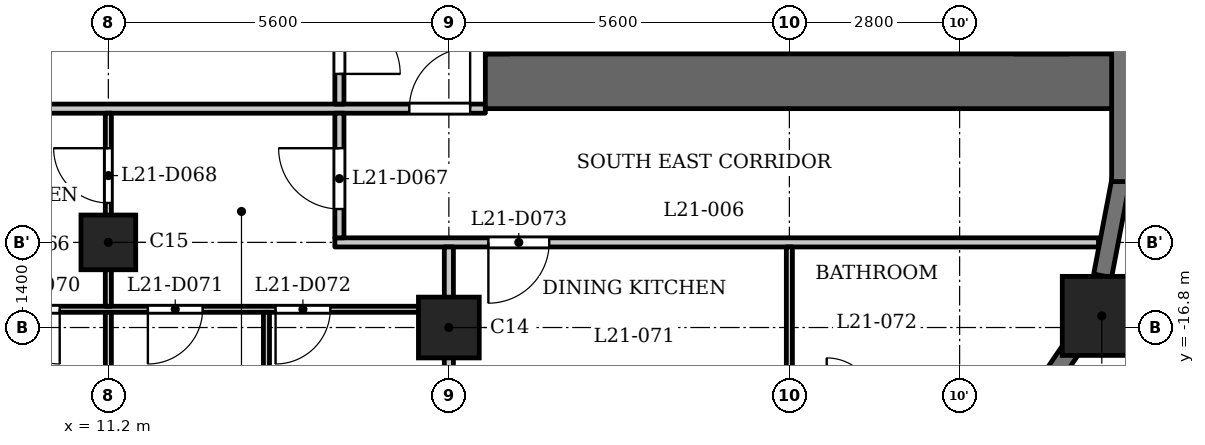
"""IFC4 building model, lengths in metres.
Left out: names, types, materials, properties, quantities, classifications, styles, units other than length and angle.
Written with IfcOpenShell. Run it as: python <this file> out.ifc"""

import sys

from ifc_helpers import new_model, si_unit, direction, frame, frame_2d, origin, origin_2d, place, context, subcontext, project, spatial, rectangle, extrude, element, fill, save


model = new_model("IFC4")
c1 = context("Model", 3, precision=1e-05, world=origin(), true_north=direction((0.0, 1.0)))
c2 = subcontext(c1, "Body", "Model", "MODEL_VIEW")
j1 = project(units=[si_unit("LENGTHUNIT", "METRE"), si_unit("PLANEANGLEUNIT", "RADIAN")], contexts=[c1])
p1 = place(None, origin())
s1 = spatial("IfcSite", under=j1, at=p1, CompositionType="ELEMENT")
p2 = place(p1, origin())
s2 = spatial("IfcBuilding", under=s1, at=p2, CompositionType="ELEMENT")
p3 = place(p2, frame((0.0, 0.0, 86.8)))
s3 = spatial("IfcBuildingStorey", under=s2, at=p3, CompositionType="ELEMENT", Elevation=86.8)
p4 = place(p3, frame((27.538, -16.609, 0.0), z_axis=(0.0, 0.0, 1.0), x_axis=(1.0, 0.0, 0.0)))
e1 = element("IfcColumn", 1, at=p4, inside=s3, PredefinedType="COLUMN", context=c2, shape_type="SweptSolid", body=[
    extrude(rectangle(XDim=1.3, YDim=1.3, at=origin_2d()), origin(), (0.0, 0.0, 1.0), 3.5),
])
p5 = place(p3, frame((16.8, -16.8, 0.0), z_axis=(0.0, 0.0, 1.0), x_axis=(1.0, 0.0, 0.0)))
e2 = element("IfcColumn", 2, at=p5, inside=s3, PredefinedType="COLUMN", context=c2, shape_type="SweptSolid", body=[
    extrude(rectangle(XDim=1.0, YDim=1.0, at=origin_2d()), origin(), (0.0, 0.0, 1.0), 3.5),
])
p6 = place(p3, frame((11.2, -15.4, 0.0), z_axis=(0.0, 0.0, 1.0), x_axis=(1.0, 0.0, 0.0)))
e3 = element("IfcColumn", 3, at=p6, inside=s3, PredefinedType="COLUMN", context=c2, shape_type="SweptSolid", body=[
    extrude(rectangle(XDim=0.9, YDim=0.9, at=origin_2d()), origin(), (0.0, 0.0, 1.0), 3.5),
])
p7 = place(p3, frame((26.589, -17.81, 0.0), z_axis=(0.0, 0.0, 1.0), x_axis=(0.562066330934, 0.827092159091, 0.0)))
e4 = element("IfcWall", 4, at=p7, inside=s3, PredefinedType="SOLIDWALL", context=c2, shape_type="SweptSolid", body=[
    extrude(rectangle(XDim=0.877, YDim=0.3, at=frame_2d((0.438, 0.0))), origin(), (0.0, 0.0, 1.0), 3.2),
])
p8 = place(p3, frame((27.552, -15.949, 0.0), z_axis=(0.0, 0.0, 1.0), x_axis=(0.187279751651, 0.982306619453, 0.0)))
e5 = element("IfcWall", 5, at=p8, inside=s3, PredefinedType="SOLIDWALL", context=c2, shape_type="SweptSolid", body=[
    extrude(rectangle(XDim=1.606, YDim=0.3, at=frame_2d((0.803, 0.0))), origin(), (0.0, 0.0, 1.0), 2.4),
])
p9 = place(p3, frame((27.85, -14.4, 0.0), z_axis=(0.0, 0.0, 1.0), x_axis=(0.0, 1.0, 0.0)))
e6 = element("IfcWall", 6, at=p9, inside=s3, PredefinedType="SOLIDWALL", context=c2, shape_type="SweptSolid", body=[
    extrude(rectangle(XDim=2.55, YDim=0.3, at=frame_2d((1.275, 0.0))), origin(), (0.0, 0.0, 1.0), 2.4),
])
p10 = place(p3, frame((17.4, -12.75, 0.0), z_axis=(0.0, 0.0, 1.0), x_axis=(1.0, 0.0, 0.0)))
e7 = element("IfcWall", 7, at=p10, inside=s3, PredefinedType="SHEAR", context=c2, shape_type="SweptSolid", body=[
    extrude(rectangle(XDim=10.4, YDim=0.9, at=frame_2d((5.2, 0.0))), origin(), (0.0, 0.0, 1.0), 3.2),
])
p11 = place(p3, frame((17.6, -12.3, 0.0), z_axis=(0.0, 0.0, 1.0), x_axis=(0.0, 1.0, 0.0)))
e8 = element("IfcWall", 8, at=p11, inside=s3, PredefinedType="SHEAR", context=c2, shape_type="SweptSolid", body=[
    extrude(rectangle(XDim=24.6, YDim=0.4, at=frame_2d((12.3, 0.0))), origin(), (0.0, 0.0, 1.0), 3.2),
])
p12 = place(p11, frame((6.0, 0.0, 0.0)))
e9 = element("IfcOpeningElement", 9, at=p12, cuts=e8, PredefinedType="OPENING", context=c2, shape_type="SweptSolid", body=[
    extrude(rectangle(XDim=1.1, YDim=2.1, at=frame_2d((0.55, 1.05))), frame((0.0, 0.21, 0.0), z_axis=(0.0, -1.0, 0.0), x_axis=(1.0, 0.0, 0.0)), (0.0, 0.0, 1.0), 0.42),
])
p13 = place(p11, frame((8.4, 0.0, 0.0)))
e10 = element("IfcOpeningElement", 10, at=p13, cuts=e8, PredefinedType="OPENING", context=c2, shape_type="SweptSolid", body=[
    extrude(rectangle(XDim=1.1, YDim=2.1, at=frame_2d((0.55, 1.05))), frame((0.0, 0.21, 0.0), z_axis=(0.0, -1.0, 0.0), x_axis=(1.0, 0.0, 0.0)), (0.0, 0.0, 1.0), 0.42),
])
p14 = place(p11, frame((10.8, 0.0, 0.0)))
e11 = element("IfcOpeningElement", 11, at=p14, cuts=e8, PredefinedType="OPENING", context=c2, shape_type="SweptSolid", body=[
    extrude(rectangle(XDim=1.1, YDim=2.1, at=frame_2d((0.55, 1.05))), frame((0.0, 0.21, 0.0), z_axis=(0.0, -1.0, 0.0), x_axis=(1.0, 0.0, 0.0)), (0.0, 0.0, 1.0), 0.42),
])
p15 = place(p11, frame((16.75, 0.0, 0.0)))
e12 = element("IfcOpeningElement", 12, at=p15, cuts=e8, PredefinedType="OPENING", context=c2, shape_type="SweptSolid", body=[
    extrude(rectangle(XDim=0.9, YDim=2.1, at=frame_2d((0.45, 1.05))), frame((0.0, 0.21, 0.0), z_axis=(0.0, -1.0, 0.0), x_axis=(1.0, 0.0, 0.0)), (0.0, 0.0, 1.0), 0.42),
])
p16 = place(p11, frame((22.8, 0.0, 0.0)))
e13 = element("IfcOpeningElement", 13, at=p16, cuts=e8, PredefinedType="OPENING", context=c2, shape_type="SweptSolid", body=[
    extrude(rectangle(XDim=1.1, YDim=2.1, at=frame_2d((0.55, 1.05))), frame((0.0, 0.21, 0.0), z_axis=(0.0, -1.0, 0.0), x_axis=(1.0, 0.0, 0.0)), (0.0, 0.0, 1.0), 0.42),
])
p17 = place(p11, frame((0.7, 0.0, 0.0)))
e14 = element("IfcOpeningElement", 14, at=p17, cuts=e8, PredefinedType="OPENING", context=c2, shape_type="SweptSolid", body=[
    extrude(rectangle(XDim=1.1, YDim=2.1, at=frame_2d((0.55, 1.05))), frame((0.0, 0.21, 0.0), z_axis=(0.0, -1.0, 0.0), x_axis=(1.0, 0.0, 0.0)), (0.0, 0.0, 1.0), 0.42),
])
p18 = place(p11, frame((12.775, 0.0, 0.0)))
e15 = element("IfcOpeningElement", 15, at=p18, cuts=e8, PredefinedType="OPENING", context=c2, shape_type="SweptSolid", body=[
    extrude(rectangle(XDim=1.8, YDim=2.1, at=frame_2d((0.9, 1.05))), frame((0.0, 0.21, 0.0), z_axis=(0.0, -1.0, 0.0), x_axis=(1.0, 0.0, 0.0)), (0.0, 0.0, 1.0), 0.42),
])
p19 = place(p3, frame((26.55, -12.3, 0.0), z_axis=(0.0, 0.0, 1.0), x_axis=(0.0, 1.0, 0.0)))
e16 = element("IfcWall", 16, at=p19, inside=s3, PredefinedType="SHEAR", context=c2, shape_type="SweptSolid", body=[
    extrude(rectangle(XDim=24.6, YDim=0.9, at=frame_2d((12.3, 0.0))), origin(), (0.0, 0.0, 1.0), 3.2),
])
p20 = place(p3, frame((23.55, -12.3, 0.0), z_axis=(0.0, 0.0, 1.0), x_axis=(0.0, 1.0, 0.0)))
e17 = element("IfcWall", 17, at=p20, inside=s3, PredefinedType="PARTITIONING", context=c2, shape_type="SweptSolid", body=[
    extrude(rectangle(XDim=2.5, YDim=0.2, at=frame_2d((1.25, 0.0))), origin(), (0.0, 0.0, 1.0), 3.2),
])
p21 = place(p20, frame((0.8, 0.0, 0.0)))
e18 = element("IfcOpeningElement", 18, at=p21, cuts=e17, PredefinedType="OPENING", context=c2, shape_type="SweptSolid", body=[
    extrude(rectangle(XDim=0.9, YDim=2.1, at=frame_2d((0.45, 1.05))), frame((0.0, 0.11, 0.0), z_axis=(0.0, -1.0, 0.0), x_axis=(1.0, 0.0, 0.0)), (0.0, 0.0, 1.0), 0.22),
])
p22 = place(p3, frame((-16.725, -16.5, 0.0), z_axis=(0.0, 0.0, 1.0), x_axis=(1.0, 0.0, 0.0)))
e19 = element("IfcWall", 19, at=p22, inside=s3, PredefinedType="PARTITIONING", context=c2, shape_type="SweptSolid", body=[
    extrude(rectangle(XDim=33.45, YDim=0.1, at=frame_2d((16.725, 0.0))), origin(), (0.0, 0.0, 1.0), 3.2),
])
p23 = place(p22, frame((3.825, 0.0, 0.0)))
e20 = element("IfcOpeningElement", 20, at=p23, cuts=e19, PredefinedType="OPENING", context=c2, shape_type="SweptSolid", body=[
    extrude(rectangle(XDim=0.8, YDim=2.1, at=frame_2d((0.4, 1.05))), frame((0.0, 0.06, 0.0), z_axis=(0.0, -1.0, 0.0), x_axis=(1.0, 0.0, 0.0)), (0.0, 0.0, 1.0), 0.12),
])
p24 = place(p22, frame((1.825, 0.0, 0.0)))
e21 = element("IfcOpeningElement", 21, at=p24, cuts=e19, PredefinedType="OPENING", context=c2, shape_type="SweptSolid", body=[
    extrude(rectangle(XDim=0.9, YDim=2.1, at=frame_2d((0.45, 1.05))), frame((0.0, 0.06, 0.0), z_axis=(0.0, -1.0, 0.0), x_axis=(1.0, 0.0, 0.0)), (0.0, 0.0, 1.0), 0.12),
])
p25 = place(p22, frame((9.675, 0.0, 0.0)))
e22 = element("IfcOpeningElement", 22, at=p25, cuts=e19, PredefinedType="OPENING", context=c2, shape_type="SweptSolid", body=[
    extrude(rectangle(XDim=0.8, YDim=2.1, at=frame_2d((0.4, 1.05))), frame((0.0, 0.06, 0.0), z_axis=(0.0, -1.0, 0.0), x_axis=(1.0, 0.0, 0.0)), (0.0, 0.0, 1.0), 0.12),
])
p26 = place(p22, frame((6.425, 0.0, 0.0)))
e23 = element("IfcOpeningElement", 23, at=p26, cuts=e19, PredefinedType="OPENING", context=c2, shape_type="SweptSolid", body=[
    extrude(rectangle(XDim=0.9, YDim=2.1, at=frame_2d((0.45, 1.05))), frame((0.0, 0.06, 0.0), z_axis=(0.0, -1.0, 0.0), x_axis=(1.0, 0.0, 0.0)), (0.0, 0.0, 1.0), 0.12),
])
p27 = place(p22, frame((15.275, 0.0, 0.0)))
e24 = element("IfcOpeningElement", 24, at=p27, cuts=e19, PredefinedType="OPENING", context=c2, shape_type="SweptSolid", body=[
    extrude(rectangle(XDim=0.8, YDim=2.1, at=frame_2d((0.4, 1.05))), frame((0.0, 0.06, 0.0), z_axis=(0.0, -1.0, 0.0), x_axis=(1.0, 0.0, 0.0)), (0.0, 0.0, 1.0), 0.12),
])
p28 = place(p22, frame((12.025, 0.0, 0.0)))
e25 = element("IfcOpeningElement", 25, at=p28, cuts=e19, PredefinedType="OPENING", context=c2, shape_type="SweptSolid", body=[
    extrude(rectangle(XDim=0.9, YDim=2.1, at=frame_2d((0.45, 1.05))), frame((0.0, 0.06, 0.0), z_axis=(0.0, -1.0, 0.0), x_axis=(1.0, 0.0, 0.0)), (0.0, 0.0, 1.0), 0.12),
])
p29 = place(p22, frame((20.875, 0.0, 0.0)))
e26 = element("IfcOpeningElement", 26, at=p29, cuts=e19, PredefinedType="OPENING", context=c2, shape_type="SweptSolid", body=[
    extrude(rectangle(XDim=0.8, YDim=2.1, at=frame_2d((0.4, 1.05))), frame((0.0, 0.06, 0.0), z_axis=(0.0, -1.0, 0.0), x_axis=(1.0, 0.0, 0.0)), (0.0, 0.0, 1.0), 0.12),
])
p30 = place(p22, frame((18.625, 0.0, 0.0)))
e27 = element("IfcOpeningElement", 27, at=p30, cuts=e19, PredefinedType="OPENING", context=c2, shape_type="SweptSolid", body=[
    extrude(rectangle(XDim=0.9, YDim=2.1, at=frame_2d((0.45, 1.05))), frame((0.0, 0.06, 0.0), z_axis=(0.0, -1.0, 0.0), x_axis=(1.0, 0.0, 0.0)), (0.0, 0.0, 1.0), 0.12),
])
p31 = place(p22, frame((23.875, 0.0, 0.0)))
e28 = element("IfcOpeningElement", 28, at=p31, cuts=e19, PredefinedType="OPENING", context=c2, shape_type="SweptSolid", body=[
    extrude(rectangle(XDim=0.8, YDim=2.1, at=frame_2d((0.4, 1.05))), frame((0.0, 0.06, 0.0), z_axis=(0.0, -1.0, 0.0), x_axis=(1.0, 0.0, 0.0)), (0.0, 0.0, 1.0), 0.12),
])
p32 = place(p22, frame((26.225, 0.0, 0.0)))
e29 = element("IfcOpeningElement", 29, at=p32, cuts=e19, PredefinedType="OPENING", context=c2, shape_type="SweptSolid", body=[
    extrude(rectangle(XDim=0.9, YDim=2.1, at=frame_2d((0.45, 1.05))), frame((0.0, 0.06, 0.0), z_axis=(0.0, -1.0, 0.0), x_axis=(1.0, 0.0, 0.0)), (0.0, 0.0, 1.0), 0.12),
])
p33 = place(p22, frame((28.575, 0.0, 0.0)))
e30 = element("IfcOpeningElement", 30, at=p33, cuts=e19, PredefinedType="OPENING", context=c2, shape_type="SweptSolid", body=[
    extrude(rectangle(XDim=0.9, YDim=2.1, at=frame_2d((0.45, 1.05))), frame((0.0, 0.06, 0.0), z_axis=(0.0, -1.0, 0.0), x_axis=(1.0, 0.0, 0.0)), (0.0, 0.0, 1.0), 0.12),
])
p34 = place(p22, frame((30.675, 0.0, 0.0)))
e31 = element("IfcOpeningElement", 31, at=p34, cuts=e19, PredefinedType="OPENING", context=c2, shape_type="SweptSolid", body=[
    extrude(rectangle(XDim=0.9, YDim=2.1, at=frame_2d((0.45, 1.05))), frame((0.0, 0.06, 0.0), z_axis=(0.0, -1.0, 0.0), x_axis=(1.0, 0.0, 0.0)), (0.0, 0.0, 1.0), 0.12),
])
p35 = place(p3, frame((14.925, -15.4, 0.0), z_axis=(0.0, 0.0, 1.0), x_axis=(1.0, 0.0, 0.0)))
e32 = element("IfcWall", 32, at=p35, inside=s3, PredefinedType="PARTITIONING", context=c2, shape_type="SweptSolid", body=[
    extrude(rectangle(XDim=12.559, YDim=0.15, at=frame_2d((6.279, 0.0))), origin(), (0.0, 0.0, 1.0), 3.2),
])
p36 = place(p35, frame((2.525, 0.0, 0.0)))
e33 = element("IfcOpeningElement", 33, at=p36, cuts=e32, PredefinedType="OPENING", context=c2, shape_type="SweptSolid", body=[
    extrude(rectangle(XDim=1.0, YDim=2.1, at=frame_2d((0.5, 1.05))), frame((0.0, 0.085, 0.0), z_axis=(0.0, -1.0, 0.0), x_axis=(1.0, 0.0, 0.0)), (0.0, 0.0, 1.0), 0.17),
])
p37 = place(p3, frame((-17.4, -13.2, 0.0), z_axis=(0.0, 0.0, 1.0), x_axis=(1.0, 0.0, 0.0)))
e34 = element("IfcWall", 34, at=p37, inside=s3, PredefinedType="PARTITIONING", context=c2, shape_type="SweptSolid", body=[
    extrude(rectangle(XDim=34.8, YDim=0.15, at=frame_2d((17.4, 0.0))), origin(), (0.0, 0.0, 1.0), 3.2),
])
p38 = place(p37, frame((0.15, 0.0, 0.0)))
e35 = element("IfcOpeningElement", 35, at=p38, cuts=e34, PredefinedType="OPENING", context=c2, shape_type="SweptSolid", body=[
    extrude(rectangle(XDim=1.0, YDim=2.1, at=frame_2d((0.5, 1.05))), frame((0.0, 0.085, 0.0), z_axis=(0.0, -1.0, 0.0), x_axis=(1.0, 0.0, 0.0)), (0.0, 0.0, 1.0), 0.17),
])
p39 = place(p37, frame((33.55, 0.0, 0.0)))
e36 = element("IfcOpeningElement", 36, at=p39, cuts=e34, PredefinedType="OPENING", context=c2, shape_type="SweptSolid", body=[
    extrude(rectangle(XDim=1.0, YDim=2.1, at=frame_2d((0.5, 1.05))), frame((0.0, 0.085, 0.0), z_axis=(0.0, -1.0, 0.0), x_axis=(1.0, 0.0, 0.0)), (0.0, 0.0, 1.0), 0.17),
])
p40 = place(p37, frame((7.35, 0.0, 0.0)))
e37 = element("IfcOpeningElement", 37, at=p40, cuts=e34, PredefinedType="OPENING", context=c2, shape_type="SweptSolid", body=[
    extrude(rectangle(XDim=1.0, YDim=2.1, at=frame_2d((0.5, 1.05))), frame((0.0, 0.085, 0.0), z_axis=(0.0, -1.0, 0.0), x_axis=(1.0, 0.0, 0.0)), (0.0, 0.0, 1.0), 0.17),
])
p41 = place(p37, frame((13.7, 0.0, 0.0)))
e38 = element("IfcOpeningElement", 38, at=p41, cuts=e34, PredefinedType="OPENING", context=c2, shape_type="SweptSolid", body=[
    extrude(rectangle(XDim=1.0, YDim=2.1, at=frame_2d((0.5, 1.05))), frame((0.0, 0.085, 0.0), z_axis=(0.0, -1.0, 0.0), x_axis=(1.0, 0.0, 0.0)), (0.0, 0.0, 1.0), 0.17),
])
p42 = place(p37, frame((19.3, 0.0, 0.0)))
e39 = element("IfcOpeningElement", 39, at=p42, cuts=e34, PredefinedType="OPENING", context=c2, shape_type="SweptSolid", body=[
    extrude(rectangle(XDim=1.0, YDim=2.1, at=frame_2d((0.5, 1.05))), frame((0.0, 0.085, 0.0), z_axis=(0.0, -1.0, 0.0), x_axis=(1.0, 0.0, 0.0)), (0.0, 0.0, 1.0), 0.17),
])
p43 = place(p3, frame((11.2, -23.03, 0.0), z_axis=(0.0, 0.0, 1.0), x_axis=(0.0, 1.0, 0.0)))
e40 = element("IfcWall", 40, at=p43, inside=s3, PredefinedType="PARTITIONING", context=c2, shape_type="SweptSolid", body=[
    extrude(rectangle(XDim=6.48, YDim=0.1, at=frame_2d((3.24, 0.0))), origin(), (0.0, 0.0, 1.0), 3.2),
])
p44 = place(p3, frame((11.2, -16.45, 0.0), z_axis=(0.0, 0.0, 1.0), x_axis=(0.0, 1.0, 0.0)))
e41 = element("IfcWall", 41, at=p44, inside=s3, PredefinedType="PARTITIONING", context=c2, shape_type="SweptSolid", body=[
    extrude(rectangle(XDim=3.175, YDim=0.1, at=frame_2d((1.587, 0.0))), origin(), (0.0, 0.0, 1.0), 3.2),
])
p45 = place(p44, frame((1.699, 0.0, 0.0)))
e42 = element("IfcOpeningElement", 42, at=p45, cuts=e41, PredefinedType="OPENING", context=c2, shape_type="SweptSolid", body=[
    extrude(rectangle(XDim=0.9, YDim=2.1, at=frame_2d((0.45, 1.05))), frame((0.0, 0.06, 0.0), z_axis=(0.0, -1.0, 0.0), x_axis=(1.0, 0.0, 0.0)), (0.0, 0.0, 1.0), 0.12),
])
p46 = place(p3, frame((13.8, -22.08, 0.0), z_axis=(0.0, 0.0, 1.0), x_axis=(0.0, 1.0, 0.0)))
e43 = element("IfcWall", 43, at=p46, inside=s3, PredefinedType="PARTITIONING", context=c2, shape_type="SweptSolid", body=[
    extrude(rectangle(XDim=5.53, YDim=0.1, at=frame_2d((2.765, 0.0))), origin(), (0.0, 0.0, 1.0), 3.2),
])
p47 = place(p3, frame((15.0, -15.325, 0.0), z_axis=(0.0, 0.0, 1.0), x_axis=(0.0, 1.0, 0.0)))
e44 = element("IfcWall", 44, at=p47, inside=s3, PredefinedType="PARTITIONING", context=c2, shape_type="SweptSolid", body=[
    extrude(rectangle(XDim=2.05, YDim=0.15, at=frame_2d((1.025, 0.0))), origin(), (0.0, 0.0, 1.0), 3.2),
])
p48 = place(p47, frame((0.474, 0.0, 0.0)))
e45 = element("IfcOpeningElement", 45, at=p48, cuts=e44, PredefinedType="OPENING", context=c2, shape_type="SweptSolid", body=[
    extrude(rectangle(XDim=1.0, YDim=2.1, at=frame_2d((0.5, 1.05))), frame((0.0, 0.085, 0.0), z_axis=(0.0, -1.0, 0.0), x_axis=(1.0, 0.0, 0.0)), (0.0, 0.0, 1.0), 0.17),
])
p49 = place(p3, frame((15.0, -13.125, 0.0), z_axis=(0.0, 0.0, 1.0), x_axis=(0.0, 1.0, 0.0)))
e46 = element("IfcWall", 46, at=p49, inside=s3, PredefinedType="PARTITIONING", context=c2, shape_type="SweptSolid", body=[
    extrude(rectangle(XDim=6.356, YDim=0.15, at=frame_2d((3.178, 0.0))), origin(), (0.0, 0.0, 1.0), 3.2),
])
p50 = place(p49, frame((0.496, 0.0, 0.0)))
e47 = element("IfcOpeningElement", 47, at=p50, cuts=e46, PredefinedType="OPENING", context=c2, shape_type="SweptSolid", body=[
    extrude(rectangle(XDim=1.0, YDim=2.1, at=frame_2d((0.5, 1.05))), frame((0.0, 0.085, 0.0), z_axis=(0.0, -1.0, 0.0), x_axis=(1.0, 0.0, 0.0)), (0.0, 0.0, 1.0), 0.17),
])
p51 = place(p3, frame((16.8, -23.03, 0.0), z_axis=(0.0, 0.0, 1.0), x_axis=(0.0, 1.0, 0.0)))
e48 = element("IfcWall", 48, at=p51, inside=s3, PredefinedType="PARTITIONING", context=c2, shape_type="SweptSolid", body=[
    extrude(rectangle(XDim=7.555, YDim=0.15, at=frame_2d((3.777, 0.0))), origin(), (0.0, 0.0, 1.0), 3.2),
])
p52 = place(p3, frame((22.4, -18.05, 0.0), z_axis=(0.0, 0.0, 1.0), x_axis=(0.0, 1.0, 0.0)))
e49 = element("IfcWall", 49, at=p52, inside=s3, PredefinedType="PARTITIONING", context=c2, shape_type="SweptSolid", body=[
    extrude(rectangle(XDim=2.575, YDim=0.1, at=frame_2d((1.288, 0.0))), origin(), (0.0, 0.0, 1.0), 3.2),
])
p53 = place(p50, origin())
e50 = element("IfcDoor", 50, at=p53, inside=s3, OperationType="SINGLE_SWING_LEFT", PredefinedType="DOOR", context=c2, shape_type="SweptSolid", body=[
    extrude(rectangle(XDim=1.0, YDim=2.1, at=frame_2d((0.5, 1.05))), frame((0.0, 0.025, 0.0), z_axis=(0.0, -1.0, 0.0), x_axis=(1.0, 0.0, 0.0)), (0.0, 0.0, 1.0), 0.05),
])
fill(e47, e50)
p54 = place(p39, origin())
e51 = element("IfcDoor", 51, at=p54, inside=s3, OperationType="SINGLE_SWING_LEFT", PredefinedType="DOOR", context=c2, shape_type="SweptSolid", body=[
    extrude(rectangle(XDim=1.0, YDim=2.1, at=frame_2d((0.5, 1.05))), frame((0.0, 0.025, 0.0), z_axis=(0.0, -1.0, 0.0), x_axis=(1.0, 0.0, 0.0)), (0.0, 0.0, 1.0), 0.05),
])
fill(e36, e51)
p55 = place(p48, origin())
e52 = element("IfcDoor", 52, at=p55, inside=s3, OperationType="SINGLE_SWING_LEFT", PredefinedType="DOOR", context=c2, shape_type="SweptSolid", body=[
    extrude(rectangle(XDim=1.0, YDim=2.1, at=frame_2d((0.5, 1.05))), frame((0.0, 0.025, 0.0), z_axis=(0.0, -1.0, 0.0), x_axis=(1.0, 0.0, 0.0)), (0.0, 0.0, 1.0), 0.05),
])
fill(e45, e52)
p56 = place(p45, origin())
e53 = element("IfcDoor", 53, at=p56, inside=s3, OperationType="SINGLE_SWING_LEFT", PredefinedType="DOOR", context=c2, shape_type="SweptSolid", body=[
    extrude(rectangle(XDim=0.9, YDim=2.1, at=frame_2d((0.45, 1.05))), frame((0.0, 0.025, 0.0), z_axis=(0.0, -1.0, 0.0), x_axis=(1.0, 0.0, 0.0)), (0.0, 0.0, 1.0), 0.05),
])
fill(e42, e53)
p57 = place(p32, origin())
e54 = element("IfcDoor", 54, at=p57, inside=s3, OperationType="SINGLE_SWING_RIGHT", PredefinedType="DOOR", context=c2, shape_type="SweptSolid", body=[
    extrude(rectangle(XDim=0.9, YDim=2.1, at=frame_2d((0.45, 1.05))), frame((0.0, 0.025, 0.0), z_axis=(0.0, -1.0, 0.0), x_axis=(1.0, 0.0, 0.0)), (0.0, 0.0, 1.0), 0.05),
])
fill(e29, e54)
p58 = place(p33, origin())
e55 = element("IfcDoor", 55, at=p58, inside=s3, OperationType="SINGLE_SWING_LEFT", PredefinedType="DOOR", context=c2, shape_type="SweptSolid", body=[
    extrude(rectangle(XDim=0.9, YDim=2.1, at=frame_2d((0.45, 1.05))), frame((0.0, 0.025, 0.0), z_axis=(0.0, -1.0, 0.0), x_axis=(1.0, 0.0, 0.0)), (0.0, 0.0, 1.0), 0.05),
])
fill(e30, e55)
p59 = place(p34, origin())
e56 = element("IfcDoor", 56, at=p59, inside=s3, OperationType="SINGLE_SWING_LEFT", PredefinedType="DOOR", context=c2, shape_type="SweptSolid", body=[
    extrude(rectangle(XDim=0.9, YDim=2.1, at=frame_2d((0.45, 1.05))), frame((0.0, 0.025, 0.0), z_axis=(0.0, -1.0, 0.0), x_axis=(1.0, 0.0, 0.0)), (0.0, 0.0, 1.0), 0.05),
])
fill(e31, e56)
p60 = place(p36, origin())
e57 = element("IfcDoor", 57, at=p60, inside=s3, OperationType="SINGLE_SWING_LEFT", PredefinedType="DOOR", context=c2, shape_type="SweptSolid", body=[
    extrude(rectangle(XDim=1.0, YDim=2.1, at=frame_2d((0.5, 1.05))), frame((0.0, 0.025, 0.0), z_axis=(0.0, -1.0, 0.0), x_axis=(1.0, 0.0, 0.0)), (0.0, 0.0, 1.0), 0.05),
])
fill(e33, e57)
save(model, sys.argv[1])
